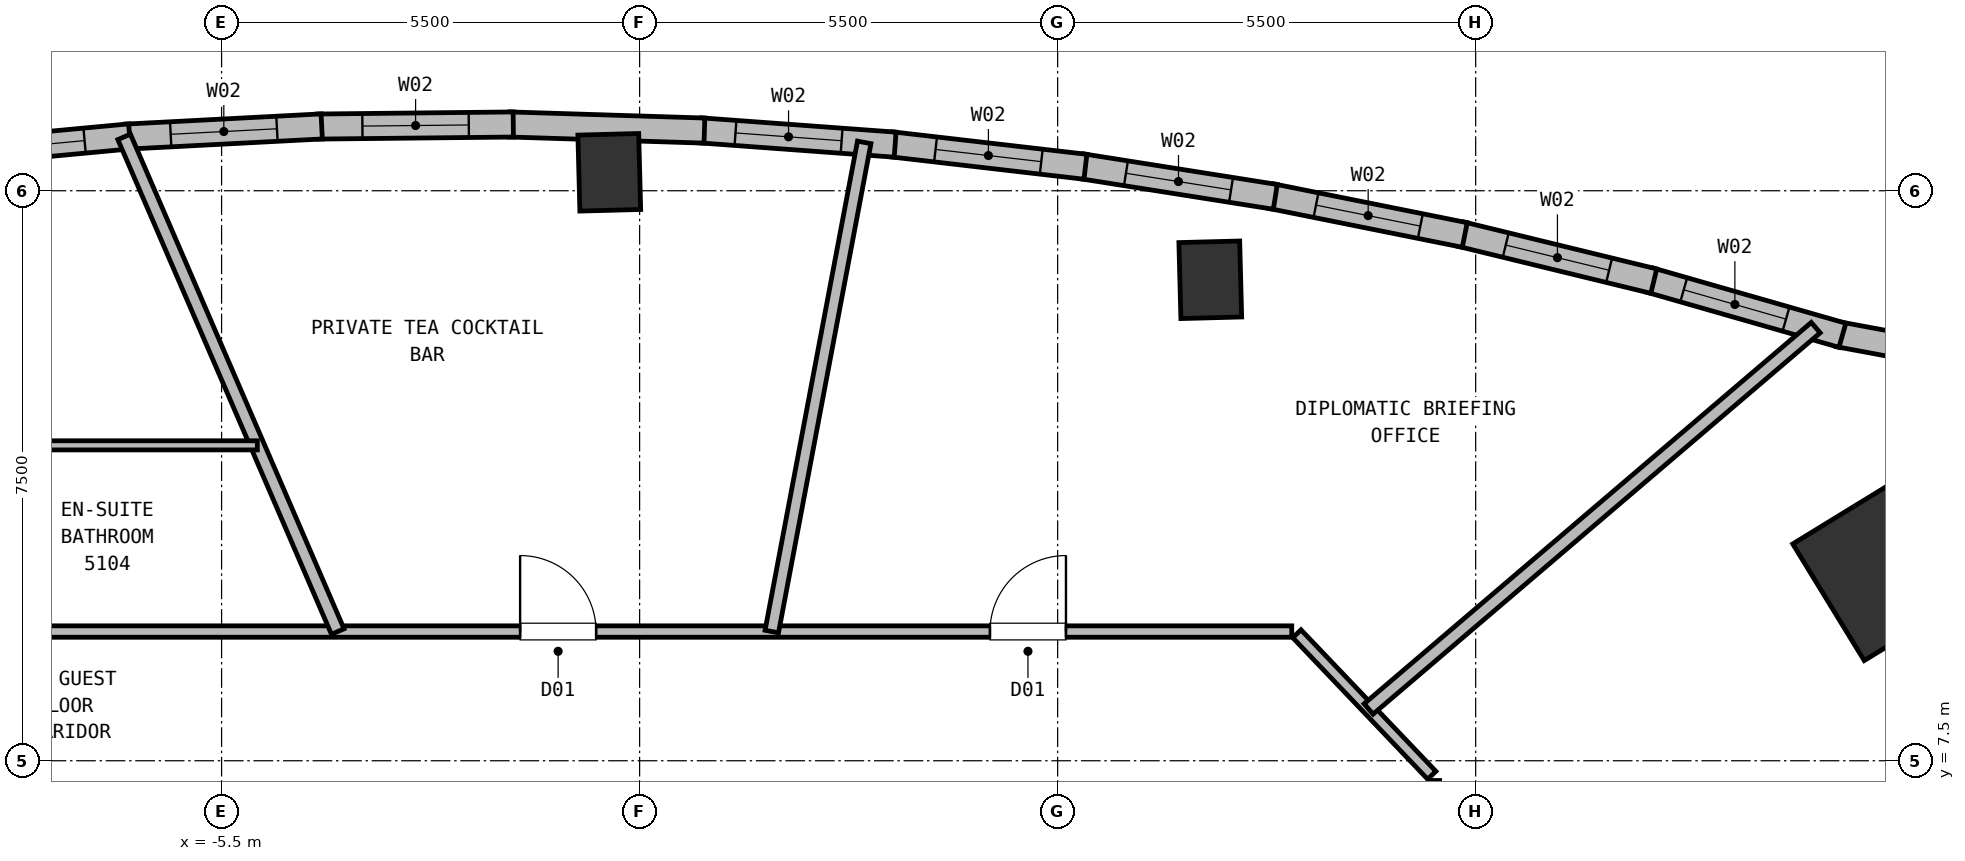
"""IFC4 building model, lengths in metres.
Left out: names, types, materials, properties, quantities, classifications, styles, units other than length and angle.
Written with IfcOpenShell. Run it as: python <this file> out.ifc"""

import sys

from ifc_helpers import new_model, si_unit, direction, frame, frame_2d, origin, origin_2d, place, context, subcontext, project, spatial, rectangle, extrude, element, fill, save


model = new_model("IFC4")
c1 = context("Model", 3, precision=1e-05, world=origin(), true_north=direction((0.0, 1.0)))
c2 = subcontext(c1, "Body", "Model", "MODEL_VIEW")
j1 = project(units=[si_unit("LENGTHUNIT", "METRE"), si_unit("PLANEANGLEUNIT", "RADIAN")], contexts=[c1])
p1 = place(None, origin())
s1 = spatial("IfcSite", under=j1, at=p1, CompositionType="ELEMENT")
p2 = place(p1, origin())
s2 = spatial("IfcBuilding", under=s1, at=p2, CompositionType="ELEMENT")
p3 = place(p2, frame((0.0, 0.0, 194.15)))
s3 = spatial("IfcBuildingStorey", under=s2, at=p3, CompositionType="ELEMENT", Elevation=194.15)
p4 = place(p3, frame((16.26, 9.964, 0.0), z_axis=(0.0, 0.0, 1.0), x_axis=(0.852640164354, 0.522498564716, 0.0)))
e1 = element("IfcColumn", 1, at=p4, inside=s3, PredefinedType="COLUMN", context=c2, shape_type="SweptSolid", body=[
    extrude(rectangle(XDim=1.45, YDim=1.8, at=origin_2d()), origin(), (0.0, 0.0, 1.0), 3.8),
])
for number, where, z_axis, x_axis in (
    (2, (7.508, 13.828, 0.0), (0.0, 0.0, 1.0), (1.0, 0.026, 0.0)),
    (3, (-0.399, 15.243, 0.0), (0.0, 0.0, 1.0), (1.0, 0.026, 0.0)),
):
    element("IfcColumn", number, at=place(p3, frame(where, z_axis=z_axis, x_axis=x_axis)), inside=s3, PredefinedType="COLUMN", context=c2, shape_type="SweptSolid", body=[
        extrude(rectangle(XDim=0.8, YDim=1.0, at=origin_2d()), origin(), (0.0, 0.0, 1.0), 3.8),
    ])
p5 = place(p3, frame((15.776, 13.11, 0.0), z_axis=(0.0, 0.0, 1.0), x_axis=(0.983270499209, -0.182151380411, 0.0)))
e4 = element("IfcWall", 4, at=p5, inside=s3, PredefinedType="SOLIDWALL", context=c2, shape_type="SweptSolid", body=[
    extrude(rectangle(XDim=1.407, YDim=0.33, at=frame_2d((0.704, 0.0))), origin(), (0.0, 0.0, 1.0), 3.55),
])
p6 = place(p3, frame((13.295, 13.823, 0.0), z_axis=(0.0, 0.0, 1.0), x_axis=(0.961267980462, -0.275615438135, 0.0)))
e5 = element("IfcWall", 5, at=p6, inside=s3, PredefinedType="SOLIDWALL", context=c2, shape_type="SweptSolid", body=[
    extrude(rectangle(XDim=2.632, YDim=0.33, at=frame_2d((1.316, 0.0))), origin(), (0.0, 0.0, 1.0), 3.55),
])
p7 = place(p6, frame((0.46, 0.0, 0.72)))
e6 = element("IfcOpeningElement", 6, at=p7, cuts=e5, PredefinedType="OPENING", context=c2, shape_type="SweptSolid", body=[
    extrude(rectangle(XDim=1.4, YDim=1.84, at=frame_2d((0.7, 0.92))), frame((0.0, 0.175, 0.0), z_axis=(0.0, -1.0, 0.0), x_axis=(1.0, 0.0, 0.0)), (0.0, 0.0, 1.0), 0.35),
])
p8 = place(p3, frame((10.808, 14.428, 0.0), z_axis=(0.0, 0.0, 1.0), x_axis=(0.971593821021, -0.236654699835, 0.0)))
e7 = element("IfcWall", 7, at=p8, inside=s3, PredefinedType="SOLIDWALL", context=c2, shape_type="SweptSolid", body=[
    extrude(rectangle(XDim=2.61, YDim=0.33, at=frame_2d((1.305, 0.0))), origin(), (0.0, 0.0, 1.0), 3.55),
])
p9 = place(p8, frame((0.605, 0.0, 0.72)))
e8 = element("IfcOpeningElement", 8, at=p9, cuts=e7, PredefinedType="OPENING", context=c2, shape_type="SweptSolid", body=[
    extrude(rectangle(XDim=1.4, YDim=1.84, at=frame_2d((0.7, 0.92))), frame((0.0, 0.175, 0.0), z_axis=(0.0, -1.0, 0.0), x_axis=(1.0, 0.0, 0.0)), (0.0, 0.0, 1.0), 0.35),
])
p10 = place(p3, frame((8.315, 14.928, 0.0), z_axis=(0.0, 0.0, 1.0), x_axis=(0.980439161236, -0.196822384688, 0.0)))
e9 = element("IfcWall", 9, at=p10, inside=s3, PredefinedType="SOLIDWALL", context=c2, shape_type="SweptSolid", body=[
    extrude(rectangle(XDim=2.593, YDim=0.33, at=frame_2d((1.296, 0.0))), origin(), (0.0, 0.0, 1.0), 3.55),
])
p11 = place(p10, frame((0.596, 0.0, 0.72)))
e10 = element("IfcOpeningElement", 10, at=p11, cuts=e9, PredefinedType="OPENING", context=c2, shape_type="SweptSolid", body=[
    extrude(rectangle(XDim=1.4, YDim=1.84, at=frame_2d((0.7, 0.92))), frame((0.0, 0.175, 0.0), z_axis=(0.0, -1.0, 0.0), x_axis=(1.0, 0.0, 0.0)), (0.0, 0.0, 1.0), 0.35),
])
p12 = place(p3, frame((5.816, 15.322, 0.0), z_axis=(0.0, 0.0, 1.0), x_axis=(0.987713798628, -0.156273644613, 0.0)))
e11 = element("IfcWall", 11, at=p12, inside=s3, PredefinedType="SOLIDWALL", context=c2, shape_type="SweptSolid", body=[
    extrude(rectangle(XDim=2.579, YDim=0.33, at=frame_2d((1.29, 0.0))), origin(), (0.0, 0.0, 1.0), 3.55),
])
p13 = place(p12, frame((0.59, 0.0, 0.72)))
e12 = element("IfcOpeningElement", 12, at=p13, cuts=e11, PredefinedType="OPENING", context=c2, shape_type="SweptSolid", body=[
    extrude(rectangle(XDim=1.4, YDim=1.84, at=frame_2d((0.7, 0.92))), frame((0.0, 0.175, 0.0), z_axis=(0.0, -1.0, 0.0), x_axis=(1.0, 0.0, 0.0)), (0.0, 0.0, 1.0), 0.35),
])
p14 = place(p3, frame((3.312, 15.611, 0.0), z_axis=(0.0, 0.0, 1.0), x_axis=(0.993362262195, -0.115027892476, 0.0)))
e13 = element("IfcWall", 13, at=p14, inside=s3, PredefinedType="SOLIDWALL", context=c2, shape_type="SweptSolid", body=[
    extrude(rectangle(XDim=2.57, YDim=0.33, at=frame_2d((1.285, 0.0))), origin(), (0.0, 0.0, 1.0), 3.55),
])
p15 = place(p14, frame((0.585, 0.0, 0.72)))
e14 = element("IfcOpeningElement", 14, at=p15, cuts=e13, PredefinedType="OPENING", context=c2, shape_type="SweptSolid", body=[
    extrude(rectangle(XDim=1.4, YDim=1.84, at=frame_2d((0.7, 0.92))), frame((0.0, 0.175, 0.0), z_axis=(0.0, -1.0, 0.0), x_axis=(1.0, 0.0, 0.0)), (0.0, 0.0, 1.0), 0.35),
])
p16 = place(p3, frame((0.803, 15.794, 0.0), z_axis=(0.0, 0.0, 1.0), x_axis=(0.9973127393, -0.073261859308, 0.0)))
e15 = element("IfcWall", 15, at=p16, inside=s3, PredefinedType="SOLIDWALL", context=c2, shape_type="SweptSolid", body=[
    extrude(rectangle(XDim=2.566, YDim=0.33, at=frame_2d((1.283, 0.0))), origin(), (0.0, 0.0, 1.0), 3.55),
])
p17 = place(p16, frame((0.46, 0.0, 0.72)))
e16 = element("IfcOpeningElement", 16, at=p17, cuts=e15, PredefinedType="OPENING", context=c2, shape_type="SweptSolid", body=[
    extrude(rectangle(XDim=1.4, YDim=1.84, at=frame_2d((0.7, 0.92))), frame((0.0, 0.175, 0.0), z_axis=(0.0, -1.0, 0.0), x_axis=(1.0, 0.0, 0.0)), (0.0, 0.0, 1.0), 0.35),
])
p18 = place(p3, frame((-1.712, 15.872, 0.0), z_axis=(0.0, 0.0, 1.0), x_axis=(0.999506957349, -0.031398124315, 0.0)))
e17 = element("IfcWall", 17, at=p18, inside=s3, PredefinedType="SOLIDWALL", context=c2, shape_type="SweptSolid", body=[
    extrude(rectangle(XDim=2.566, YDim=0.33, at=frame_2d((1.283, 0.0))), origin(), (0.0, 0.0, 1.0), 3.55),
])
p19 = place(p3, frame((-4.233, 15.845, 0.0), z_axis=(0.0, 0.0, 1.0), x_axis=(0.999945431053, 0.010446765829, 0.0)))
e18 = element("IfcWall", 18, at=p19, inside=s3, PredefinedType="SOLIDWALL", context=c2, shape_type="SweptSolid", body=[
    extrude(rectangle(XDim=2.571, YDim=0.33, at=frame_2d((1.285, 0.0))), origin(), (0.0, 0.0, 1.0), 3.55),
])
p20 = place(p19, frame((0.585, 0.0, 0.72)))
e19 = element("IfcOpeningElement", 19, at=p20, cuts=e18, PredefinedType="OPENING", context=c2, shape_type="SweptSolid", body=[
    extrude(rectangle(XDim=1.4, YDim=1.84, at=frame_2d((0.7, 0.92))), frame((0.0, 0.175, 0.0), z_axis=(0.0, -1.0, 0.0), x_axis=(1.0, 0.0, 0.0)), (0.0, 0.0, 1.0), 0.35),
])
p21 = place(p3, frame((-6.759, 15.712, 0.0), z_axis=(0.0, 0.0, 1.0), x_axis=(0.998644110944, 0.052057080942, 0.0)))
e20 = element("IfcWall", 20, at=p21, inside=s3, PredefinedType="SOLIDWALL", context=c2, shape_type="SweptSolid", body=[
    extrude(rectangle(XDim=2.579, YDim=0.33, at=frame_2d((1.29, 0.0))), origin(), (0.0, 0.0, 1.0), 3.55),
])
p22 = place(p21, frame((0.59, 0.0, 0.72)))
e21 = element("IfcOpeningElement", 21, at=p22, cuts=e20, PredefinedType="OPENING", context=c2, shape_type="SweptSolid", body=[
    extrude(rectangle(XDim=1.4, YDim=1.84, at=frame_2d((0.7, 0.92))), frame((0.0, 0.175, 0.0), z_axis=(0.0, -1.0, 0.0), x_axis=(1.0, 0.0, 0.0)), (0.0, 0.0, 1.0), 0.35),
])
p23 = place(p3, frame((-9.29, 15.473, 0.0), z_axis=(0.0, 0.0, 1.0), x_axis=(0.9956361402, 0.093320288938, 0.0)))
e22 = element("IfcWall", 22, at=p23, inside=s3, PredefinedType="SOLIDWALL", context=c2, shape_type="SweptSolid", body=[
    extrude(rectangle(XDim=2.593, YDim=0.33, at=frame_2d((1.296, 0.0))), origin(), (0.0, 0.0, 1.0), 3.55),
])
p24 = place(p23, frame((0.596, 0.0, 0.72)))
e23 = element("IfcOpeningElement", 23, at=p24, cuts=e22, PredefinedType="OPENING", context=c2, shape_type="SweptSolid", body=[
    extrude(rectangle(XDim=1.4, YDim=1.84, at=frame_2d((0.7, 0.92))), frame((0.0, 0.175, 0.0), z_axis=(0.0, -1.0, 0.0), x_axis=(1.0, 0.0, 0.0)), (0.0, 0.0, 1.0), 0.35),
])
p25 = place(p3, frame((10.45, 7.24, 0.0), z_axis=(0.0, 0.0, 1.0), x_axis=(0.0, -1.0, 0.0)))
e24 = element("IfcWall", 24, at=p25, inside=s3, PredefinedType="PARTITIONING", context=c2, shape_type="SweptSolid", body=[
    extrude(rectangle(XDim=14.48, YDim=0.15, at=frame_2d((7.24, 0.0))), origin(), (0.0, 0.0, 1.0), 3.55),
])
p26 = place(p25, frame((8.362, 0.0, 0.0)))
e25 = element("IfcOpeningElement", 25, at=p26, cuts=e24, PredefinedType="OPENING", context=c2, shape_type="SweptSolid", body=[
    extrude(rectangle(XDim=1.06, YDim=2.15, at=frame_2d((0.53, 1.075))), frame((0.0, 0.085, 0.0), z_axis=(0.0, -1.0, 0.0), x_axis=(1.0, 0.0, 0.0)), (0.0, 0.0, 1.0), 0.17),
])
p27 = place(p25, frame((2.905, 0.0, 0.0)))
e26 = element("IfcOpeningElement", 26, at=p27, cuts=e24, PredefinedType="OPENING", context=c2, shape_type="SweptSolid", body=[
    extrude(rectangle(XDim=1.0, YDim=2.15, at=frame_2d((0.5, 1.075))), frame((0.0, 0.085, 0.0), z_axis=(0.0, -1.0, 0.0), x_axis=(1.0, 0.0, 0.0)), (0.0, 0.0, 1.0), 0.17),
])
p28 = place(p3, frame((8.648, 9.171, 0.0), z_axis=(0.0, 0.0, 1.0), x_axis=(0.689960858356, -0.723846678473, 0.0)))
e27 = element("IfcWall", 27, at=p28, inside=s3, PredefinedType="PARTITIONING", context=c2, shape_type="SweptSolid", body=[
    extrude(rectangle(XDim=2.572, YDim=0.15, at=frame_2d((1.286, 0.0))), origin(), (0.0, 0.0, 1.0), 3.55),
])
p29 = place(p3, frame((-8.58, 9.2, 0.0), z_axis=(0.0, 0.0, 1.0), x_axis=(1.0, 0.0, 0.0)))
e28 = element("IfcWall", 28, at=p29, inside=s3, PredefinedType="PARTITIONING", context=c2, shape_type="SweptSolid", body=[
    extrude(rectangle(XDim=17.16, YDim=0.15, at=frame_2d((8.58, 0.0))), origin(), (0.0, 0.0, 1.0), 3.55),
])
p30 = place(p29, frame((7.008, 0.0, 0.0)))
e29 = element("IfcOpeningElement", 29, at=p30, cuts=e28, PredefinedType="OPENING", context=c2, shape_type="SweptSolid", body=[
    extrude(rectangle(XDim=1.0, YDim=2.15, at=frame_2d((0.5, 1.075))), frame((0.0, 0.085, 0.0), z_axis=(0.0, -1.0, 0.0), x_axis=(1.0, 0.0, 0.0)), (0.0, 0.0, 1.0), 0.17),
])
p31 = place(p29, frame((13.189, 0.0, 0.0)))
e30 = element("IfcOpeningElement", 30, at=p31, cuts=e28, PredefinedType="OPENING", context=c2, shape_type="SweptSolid", body=[
    extrude(rectangle(XDim=1.0, YDim=2.15, at=frame_2d((0.5, 1.075))), frame((0.0, 0.085, 0.0), z_axis=(0.0, -1.0, 0.0), x_axis=(1.0, 0.0, 0.0)), (0.0, 0.0, 1.0), 0.17),
])
p32 = place(p3, frame((9.591, 8.181, 0.0), z_axis=(0.0, 0.0, 1.0), x_axis=(0.760812400489, 0.648971872474, 0.0)))
e31 = element("IfcWall", 31, at=p32, inside=s3, PredefinedType="PARTITIONING", context=c2, shape_type="SweptSolid", body=[
    extrude(rectangle(XDim=7.732, YDim=0.18, at=frame_2d((3.866, 0.0))), origin(), (0.0, 0.0, 1.0), 3.55),
])
p33 = place(p3, frame((1.739, 9.2, 0.0), z_axis=(0.0, 0.0, 1.0), x_axis=(0.185690346743, 0.98260831216, 0.0)))
e32 = element("IfcWall", 32, at=p33, inside=s3, PredefinedType="PARTITIONING", context=c2, shape_type="SweptSolid", body=[
    extrude(rectangle(XDim=6.55, YDim=0.18, at=frame_2d((3.275, 0.0))), origin(), (0.0, 0.0, 1.0), 3.55),
])
p34 = place(p3, frame((-3.972, 9.2, 0.0), z_axis=(0.0, 0.0, 1.0), x_axis=(-0.396382581843, 0.918085425661, 0.0)))
e33 = element("IfcWall", 33, at=p34, inside=s3, PredefinedType="PARTITIONING", context=c2, shape_type="SweptSolid", body=[
    extrude(rectangle(XDim=7.089, YDim=0.18, at=frame_2d((3.545, 0.0))), origin(), (0.0, 0.0, 1.0), 3.55),
])
p35 = place(p3, frame((-5.03, 11.65, 0.0), z_axis=(0.0, 0.0, 1.0), x_axis=(-1.0, 0.0, 0.0)))
e34 = element("IfcWall", 34, at=p35, inside=s3, PredefinedType="PARTITIONING", context=c2, shape_type="SweptSolid", body=[
    extrude(rectangle(XDim=4.64, YDim=0.12, at=frame_2d((2.32, 0.0))), origin(), (0.0, 0.0, 1.0), 3.55),
])
p36 = place(p7, origin())
e35 = element("IfcWindow", 35, at=p36, inside=s3, PartitioningType="SINGLE_PANEL", PredefinedType="WINDOW", context=c2, shape_type="SweptSolid", body=[
    extrude(rectangle(XDim=1.4, YDim=1.84, at=frame_2d((0.7, 0.92))), frame((0.0, 0.03, 0.0), z_axis=(0.0, -1.0, 0.0), x_axis=(1.0, 0.0, 0.0)), (0.0, 0.0, 1.0), 0.06),
])
fill(e6, e35)
p37 = place(p9, origin())
e36 = element("IfcWindow", 36, at=p37, inside=s3, PartitioningType="SINGLE_PANEL", PredefinedType="WINDOW", context=c2, shape_type="SweptSolid", body=[
    extrude(rectangle(XDim=1.4, YDim=1.84, at=frame_2d((0.7, 0.92))), frame((0.0, 0.03, 0.0), z_axis=(0.0, -1.0, 0.0), x_axis=(1.0, 0.0, 0.0)), (0.0, 0.0, 1.0), 0.06),
])
fill(e8, e36)
p38 = place(p11, origin())
e37 = element("IfcWindow", 37, at=p38, inside=s3, PartitioningType="SINGLE_PANEL", PredefinedType="WINDOW", context=c2, shape_type="SweptSolid", body=[
    extrude(rectangle(XDim=1.4, YDim=1.84, at=frame_2d((0.7, 0.92))), frame((0.0, 0.03, 0.0), z_axis=(0.0, -1.0, 0.0), x_axis=(1.0, 0.0, 0.0)), (0.0, 0.0, 1.0), 0.06),
])
fill(e10, e37)
p39 = place(p13, origin())
e38 = element("IfcWindow", 38, at=p39, inside=s3, PartitioningType="SINGLE_PANEL", PredefinedType="WINDOW", context=c2, shape_type="SweptSolid", body=[
    extrude(rectangle(XDim=1.4, YDim=1.84, at=frame_2d((0.7, 0.92))), frame((0.0, 0.03, 0.0), z_axis=(0.0, -1.0, 0.0), x_axis=(1.0, 0.0, 0.0)), (0.0, 0.0, 1.0), 0.06),
])
fill(e12, e38)
p40 = place(p15, origin())
e39 = element("IfcWindow", 39, at=p40, inside=s3, PartitioningType="SINGLE_PANEL", PredefinedType="WINDOW", context=c2, shape_type="SweptSolid", body=[
    extrude(rectangle(XDim=1.4, YDim=1.84, at=frame_2d((0.7, 0.92))), frame((0.0, 0.03, 0.0), z_axis=(0.0, -1.0, 0.0), x_axis=(1.0, 0.0, 0.0)), (0.0, 0.0, 1.0), 0.06),
])
fill(e14, e39)
p41 = place(p17, origin())
e40 = element("IfcWindow", 40, at=p41, inside=s3, PartitioningType="SINGLE_PANEL", PredefinedType="WINDOW", context=c2, shape_type="SweptSolid", body=[
    extrude(rectangle(XDim=1.4, YDim=1.84, at=frame_2d((0.7, 0.92))), frame((0.0, 0.03, 0.0), z_axis=(0.0, -1.0, 0.0), x_axis=(1.0, 0.0, 0.0)), (0.0, 0.0, 1.0), 0.06),
])
fill(e16, e40)
p42 = place(p20, origin())
e41 = element("IfcWindow", 41, at=p42, inside=s3, PartitioningType="SINGLE_PANEL", PredefinedType="WINDOW", context=c2, shape_type="SweptSolid", body=[
    extrude(rectangle(XDim=1.4, YDim=1.84, at=frame_2d((0.7, 0.92))), frame((0.0, 0.03, 0.0), z_axis=(0.0, -1.0, 0.0), x_axis=(1.0, 0.0, 0.0)), (0.0, 0.0, 1.0), 0.06),
])
fill(e19, e41)
p43 = place(p22, origin())
e42 = element("IfcWindow", 42, at=p43, inside=s3, PartitioningType="SINGLE_PANEL", PredefinedType="WINDOW", context=c2, shape_type="SweptSolid", body=[
    extrude(rectangle(XDim=1.4, YDim=1.84, at=frame_2d((0.7, 0.92))), frame((0.0, 0.03, 0.0), z_axis=(0.0, -1.0, 0.0), x_axis=(1.0, 0.0, 0.0)), (0.0, 0.0, 1.0), 0.06),
])
fill(e21, e42)
p44 = place(p24, origin())
e43 = element("IfcWindow", 43, at=p44, inside=s3, PartitioningType="SINGLE_PANEL", PredefinedType="WINDOW", context=c2, shape_type="SweptSolid", body=[
    extrude(rectangle(XDim=1.4, YDim=1.84, at=frame_2d((0.7, 0.92))), frame((0.0, 0.03, 0.0), z_axis=(0.0, -1.0, 0.0), x_axis=(1.0, 0.0, 0.0)), (0.0, 0.0, 1.0), 0.06),
])
fill(e23, e43)
p45 = place(p30, origin())
e44 = element("IfcDoor", 44, at=p45, inside=s3, OperationType="SINGLE_SWING_LEFT", PredefinedType="DOOR", context=c2, shape_type="SweptSolid", body=[
    extrude(rectangle(XDim=1.0, YDim=2.15, at=frame_2d((0.5, 1.075))), frame((0.0, 0.025, 0.0), z_axis=(0.0, -1.0, 0.0), x_axis=(1.0, 0.0, 0.0)), (0.0, 0.0, 1.0), 0.05),
])
fill(e29, e44)
p46 = place(p31, origin())
e45 = element("IfcDoor", 45, at=p46, inside=s3, OperationType="SINGLE_SWING_RIGHT", PredefinedType="DOOR", context=c2, shape_type="SweptSolid", body=[
    extrude(rectangle(XDim=1.0, YDim=2.15, at=frame_2d((0.5, 1.075))), frame((0.0, 0.025, 0.0), z_axis=(0.0, -1.0, 0.0), x_axis=(1.0, 0.0, 0.0)), (0.0, 0.0, 1.0), 0.05),
])
fill(e30, e45)
save(model, sys.argv[1])
